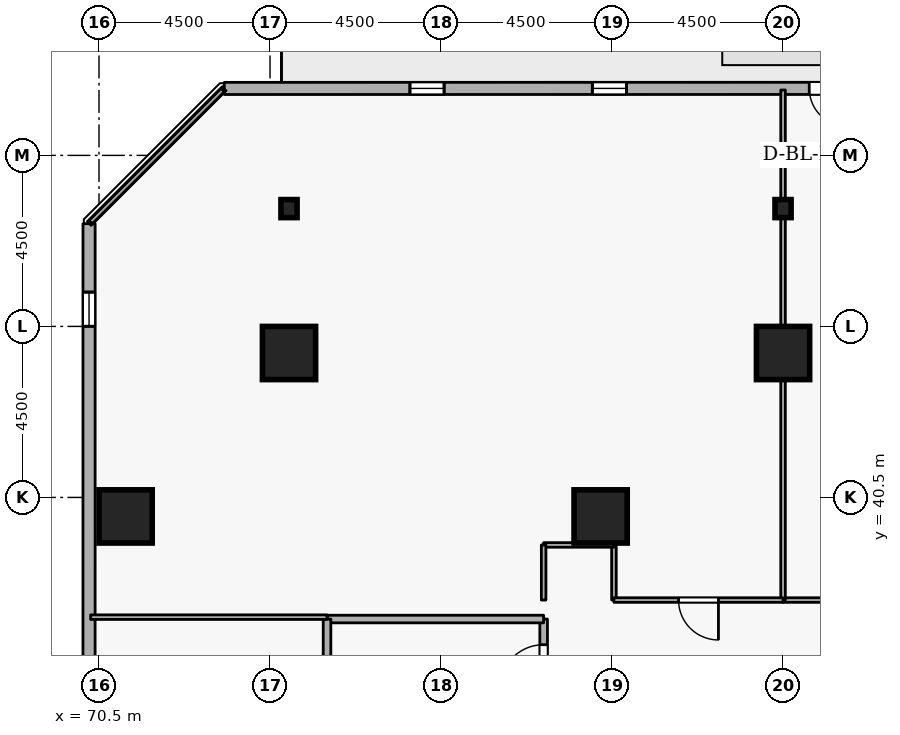
"""IFC4 building model, lengths in metres.
Left out: names, types, materials, properties, quantities, classifications, styles, units other than length and angle.
Written with IfcOpenShell. Run it as: python <this file> out.ifc"""

import sys

from ifc_helpers import new_model, si_unit, direction, frame, frame_2d, origin, origin_2d, place, context, subcontext, project, spatial, rectangle, i_section, extrude, element, fill, save


model = new_model("IFC4")
c1 = context("Model", 3, precision=1e-05, world=origin(), true_north=direction((0.0, 1.0)))
c2 = subcontext(c1, "Body", "Model", "MODEL_VIEW")
j1 = project(units=[si_unit("LENGTHUNIT", "METRE"), si_unit("PLANEANGLEUNIT", "RADIAN")], contexts=[c1])
p1 = place(None, origin())
s1 = spatial("IfcSite", under=j1, at=p1, CompositionType="ELEMENT")
p2 = place(p1, origin())
s2 = spatial("IfcBuilding", under=s1, at=p2, CompositionType="ELEMENT")
p3 = place(p2, frame((0.0, 0.0, 57.3)))
s3 = spatial("IfcBuildingStorey", under=s2, at=p3, CompositionType="ELEMENT", Elevation=57.3)
for number, where, z_axis, x_axis in (
    (1, (88.5, 44.3, 0.0), (0.0, 0.0, 1.0), (1.0, 0.0, 0.0)),
    (2, (75.5, 44.3, 0.0), (0.0, 0.0, 1.0), (1.0, 0.0, 0.0)),
    (3, (71.2, 40.0, 0.0), (0.0, 0.0, 1.0), (1.0, 0.0, 0.0)),
    (4, (83.7, 40.0, 0.0), (0.0, 0.0, 1.0), (1.0, 0.0, 0.0)),
):
    element("IfcColumn", number, at=place(p3, frame(where, z_axis=z_axis, x_axis=x_axis)), inside=s3, PredefinedType="COLUMN", context=c2, shape_type="SweptSolid", body=[
        extrude(rectangle(XDim=1.4, YDim=1.4, at=origin_2d()), origin(), (0.0, 0.0, 1.0), 3.6),
    ])
for number, where, z_axis, x_axis in (
    (5, (88.5, 48.1, 0.0), (0.0, 0.0, 1.0), (1.0, 0.0, 0.0)),
    (6, (75.5, 48.1, 0.0), (0.0, 0.0, 1.0), (1.0, 0.0, 0.0)),
):
    element("IfcColumn", number, at=place(p3, frame(where, z_axis=z_axis, x_axis=x_axis)), inside=s3, PredefinedType="COLUMN", context=c2, shape_type="SweptSolid", body=[
        extrude(i_section(OverallWidth=0.424, OverallDepth=0.475, WebThickness=0.048, FlangeThickness=0.077, FilletRadius=0.015, at=origin_2d()), origin(), (0.0, 0.0, 1.0), 3.6),
    ])
p4 = place(p3, frame((110.181, 51.265, 0.0), z_axis=(0.0, 0.0, 1.0), x_axis=(-0.999999996195, -8.7231344e-05, 0.0)))
e7 = element("IfcWall", 7, at=p4, inside=s3, PredefinedType="STANDARD", context=c2, shape_type="SweptSolid", body=[
    extrude(rectangle(XDim=36.384, YDim=0.32, at=frame_2d((18.192, 0.0))), origin(), (0.0, 0.0, 1.0), 2.7),
])
p5 = place(p4, frame((19.992, 0.0, 0.0)))
e8 = element("IfcOpeningElement", 8, at=p5, cuts=e7, PredefinedType="OPENING", context=c2, shape_type="SweptSolid", body=[
    extrude(rectangle(XDim=1.0, YDim=2.08, at=frame_2d((0.5, 1.04))), frame((0.0, 0.17, 0.0), z_axis=(0.0, -1.0, 0.0), x_axis=(1.0, 0.0, 0.0)), (0.0, 0.0, 1.0), 0.34),
])
p6 = place(p4, frame((1.8, 0.0, 0.72)))
e9 = element("IfcOpeningElement", 9, at=p6, cuts=e7, PredefinedType="OPENING", context=c2, shape_type="SweptSolid", body=[
    extrude(rectangle(XDim=0.9, YDim=1.75, at=frame_2d((0.45, 0.875))), frame((0.0, 0.17, 0.0), z_axis=(0.0, -1.0, 0.0), x_axis=(1.0, 0.0, 0.0)), (0.0, 0.0, 1.0), 0.34),
])
p7 = place(p4, frame((6.6, 0.0, 0.72)))
e10 = element("IfcOpeningElement", 10, at=p7, cuts=e7, PredefinedType="OPENING", context=c2, shape_type="SweptSolid", body=[
    extrude(rectangle(XDim=0.9, YDim=1.75, at=frame_2d((0.45, 0.875))), frame((0.0, 0.17, 0.0), z_axis=(0.0, -1.0, 0.0), x_axis=(1.0, 0.0, 0.0)), (0.0, 0.0, 1.0), 0.34),
])
p8 = place(p4, frame((11.4, 0.0, 0.72)))
e11 = element("IfcOpeningElement", 11, at=p8, cuts=e7, PredefinedType="OPENING", context=c2, shape_type="SweptSolid", body=[
    extrude(rectangle(XDim=0.9, YDim=1.75, at=frame_2d((0.45, 0.875))), frame((0.0, 0.17, 0.0), z_axis=(0.0, -1.0, 0.0), x_axis=(1.0, 0.0, 0.0)), (0.0, 0.0, 1.0), 0.34),
])
p9 = place(p4, frame((16.2, 0.0, 0.72)))
e12 = element("IfcOpeningElement", 12, at=p9, cuts=e7, PredefinedType="OPENING", context=c2, shape_type="SweptSolid", body=[
    extrude(rectangle(XDim=0.9, YDim=1.75, at=frame_2d((0.45, 0.875))), frame((0.0, 0.17, 0.0), z_axis=(0.0, -1.0, 0.0), x_axis=(1.0, 0.0, 0.0)), (0.0, 0.0, 1.0), 0.34),
])
p10 = place(p4, frame((25.8, 0.0, 0.72)))
e13 = element("IfcOpeningElement", 13, at=p10, cuts=e7, PredefinedType="OPENING", context=c2, shape_type="SweptSolid", body=[
    extrude(rectangle(XDim=0.9, YDim=1.75, at=frame_2d((0.45, 0.875))), frame((0.0, 0.17, 0.0), z_axis=(0.0, -1.0, 0.0), x_axis=(1.0, 0.0, 0.0)), (0.0, 0.0, 1.0), 0.34),
])
p11 = place(p4, frame((30.6, 0.0, 0.72)))
e14 = element("IfcOpeningElement", 14, at=p11, cuts=e7, PredefinedType="OPENING", context=c2, shape_type="SweptSolid", body=[
    extrude(rectangle(XDim=0.9, YDim=1.75, at=frame_2d((0.45, 0.875))), frame((0.0, 0.17, 0.0), z_axis=(0.0, -1.0, 0.0), x_axis=(1.0, 0.0, 0.0)), (0.0, 0.0, 1.0), 0.34),
])
p12 = place(p3, frame((70.238, 47.703, 0.0), z_axis=(0.0, 0.0, 1.0), x_axis=(-8.7231344e-05, -0.999999996195, 0.0)))
e15 = element("IfcWall", 15, at=p12, inside=s3, PredefinedType="STANDARD", context=c2, shape_type="SweptSolid", body=[
    extrude(rectangle(XDim=36.384, YDim=0.32, at=frame_2d((18.192, 0.0))), origin(), (0.0, 0.0, 1.0), 2.7),
])
p13 = place(p12, frame((1.8, 0.0, 0.72)))
e16 = element("IfcOpeningElement", 16, at=p13, cuts=e15, PredefinedType="OPENING", context=c2, shape_type="SweptSolid", body=[
    extrude(rectangle(XDim=0.9, YDim=1.75, at=frame_2d((0.45, 0.875))), frame((0.0, 0.17, 0.0), z_axis=(0.0, -1.0, 0.0), x_axis=(1.0, 0.0, 0.0)), (0.0, 0.0, 1.0), 0.34),
])
p14 = place(p12, frame((11.4, 0.0, 0.72)))
e17 = element("IfcOpeningElement", 17, at=p14, cuts=e15, PredefinedType="OPENING", context=c2, shape_type="SweptSolid", body=[
    extrude(rectangle(XDim=0.9, YDim=1.75, at=frame_2d((0.45, 0.875))), frame((0.0, 0.17, 0.0), z_axis=(0.0, -1.0, 0.0), x_axis=(1.0, 0.0, 0.0)), (0.0, 0.0, 1.0), 0.34),
])
p15 = place(p12, frame((16.2, 0.0, 0.72)))
e18 = element("IfcOpeningElement", 18, at=p15, cuts=e15, PredefinedType="OPENING", context=c2, shape_type="SweptSolid", body=[
    extrude(rectangle(XDim=0.9, YDim=1.75, at=frame_2d((0.45, 0.875))), frame((0.0, 0.17, 0.0), z_axis=(0.0, -1.0, 0.0), x_axis=(1.0, 0.0, 0.0)), (0.0, 0.0, 1.0), 0.34),
])
p16 = place(p12, frame((25.8, 0.0, 0.72)))
e19 = element("IfcOpeningElement", 19, at=p16, cuts=e15, PredefinedType="OPENING", context=c2, shape_type="SweptSolid", body=[
    extrude(rectangle(XDim=0.9, YDim=1.75, at=frame_2d((0.45, 0.875))), frame((0.0, 0.17, 0.0), z_axis=(0.0, -1.0, 0.0), x_axis=(1.0, 0.0, 0.0)), (0.0, 0.0, 1.0), 0.34),
])
p17 = place(p12, frame((30.6, 0.0, 0.72)))
e20 = element("IfcOpeningElement", 20, at=p17, cuts=e15, PredefinedType="OPENING", context=c2, shape_type="SweptSolid", body=[
    extrude(rectangle(XDim=0.9, YDim=1.75, at=frame_2d((0.45, 0.875))), frame((0.0, 0.17, 0.0), z_axis=(0.0, -1.0, 0.0), x_axis=(1.0, 0.0, 0.0)), (0.0, 0.0, 1.0), 0.34),
])
p18 = place(p3, frame((82.2, 34.8, 0.0), z_axis=(0.0, 0.0, 1.0), x_axis=(0.0, 1.0, 0.0)))
e21 = element("IfcWall", 21, at=p18, inside=s3, PredefinedType="STANDARD", context=c2, shape_type="SweptSolid", body=[
    extrude(rectangle(XDim=2.5, YDim=0.2, at=frame_2d((1.25, 0.0))), origin(), (0.0, 0.0, 1.0), 3.34),
])
p19 = place(p18, frame((0.675, 0.0, 0.0)))
e22 = element("IfcOpeningElement", 22, at=p19, cuts=e21, PredefinedType="OPENING", context=c2, shape_type="SweptSolid", body=[
    extrude(rectangle(XDim=1.15, YDim=2.1, at=frame_2d((0.575, 1.05))), frame((0.0, 0.11, 0.0), z_axis=(0.0, -1.0, 0.0), x_axis=(1.0, 0.0, 0.0)), (0.0, 0.0, 1.0), 0.22),
])
p20 = place(p3, frame((82.2, 37.3, 0.0), z_axis=(0.0, 0.0, 1.0), x_axis=(-1.0, 0.0, 0.0)))
e23 = element("IfcWall", 23, at=p20, inside=s3, PredefinedType="STANDARD", context=c2, shape_type="SweptSolid", body=[
    extrude(rectangle(XDim=5.7, YDim=0.2, at=frame_2d((2.85, 0.0))), origin(), (0.0, 0.0, 1.0), 3.34),
])
p21 = place(p3, frame((76.5, 37.3, 0.0), z_axis=(0.0, 0.0, 1.0), x_axis=(0.0, -1.0, 0.0)))
e24 = element("IfcWall", 24, at=p21, inside=s3, PredefinedType="STANDARD", context=c2, shape_type="SweptSolid", body=[
    extrude(rectangle(XDim=2.5, YDim=0.2, at=frame_2d((1.25, 0.0))), origin(), (0.0, 0.0, 1.0), 3.34),
])
p22 = place(p3, frame((92.95, 37.8, 0.0), z_axis=(0.0, 0.0, 1.0), x_axis=(-1.0, 0.0, 0.0)))
e25 = element("IfcWall", 25, at=p22, inside=s3, PredefinedType="PARTITIONING", context=c2, shape_type="SweptSolid", body=[
    extrude(rectangle(XDim=4.45, YDim=0.12, at=frame_2d((2.225, 0.0))), origin(), (0.0, 0.0, 1.0), 3.34),
])
p23 = place(p22, frame((1.7, 0.0, 0.0)))
e26 = element("IfcOpeningElement", 26, at=p23, cuts=e25, PredefinedType="OPENING", context=c2, shape_type="SweptSolid", body=[
    extrude(rectangle(XDim=1.05, YDim=2.1, at=frame_2d((0.525, 1.05))), frame((0.0, 0.07, 0.0), z_axis=(0.0, -1.0, 0.0), x_axis=(1.0, 0.0, 0.0)), (0.0, 0.0, 1.0), 0.14),
])
p24 = place(p3, frame((88.5, 37.8, 0.0), z_axis=(0.0, 0.0, 1.0), x_axis=(0.0, 1.0, 0.0)))
e27 = element("IfcWall", 27, at=p24, inside=s3, PredefinedType="PARTITIONING", context=c2, shape_type="SweptSolid", body=[
    extrude(rectangle(XDim=13.42, YDim=0.12, at=frame_2d((6.71, 0.0))), origin(), (0.0, 0.0, 1.0), 2.932),
])
p25 = place(p3, frame((84.05, 37.8, 0.0), z_axis=(0.0, 0.0, 1.0), x_axis=(0.0, 1.0, 0.0)))
e28 = element("IfcWall", 28, at=p25, inside=s3, PredefinedType="PARTITIONING", context=c2, shape_type="SweptSolid", body=[
    extrude(rectangle(XDim=1.45, YDim=0.12, at=frame_2d((0.725, 0.0))), origin(), (0.0, 0.0, 1.0), 3.34),
])
p26 = place(p3, frame((84.05, 39.25, 0.0), z_axis=(0.0, 0.0, 1.0), x_axis=(-1.0, 0.0, 0.0)))
e29 = element("IfcWall", 29, at=p26, inside=s3, PredefinedType="PARTITIONING", context=c2, shape_type="SweptSolid", body=[
    extrude(rectangle(XDim=1.85, YDim=0.12, at=frame_2d((0.925, 0.0))), origin(), (0.0, 0.0, 1.0), 3.34),
])
p27 = place(p3, frame((82.2, 39.25, 0.0), z_axis=(0.0, 0.0, 1.0), x_axis=(0.0, -1.0, 0.0)))
e30 = element("IfcWall", 30, at=p27, inside=s3, PredefinedType="PARTITIONING", context=c2, shape_type="SweptSolid", body=[
    extrude(rectangle(XDim=1.45, YDim=0.12, at=frame_2d((0.725, 0.0))), origin(), (0.0, 0.0, 1.0), 3.34),
])
p28 = place(p3, frame((76.5, 37.35, 0.0), z_axis=(0.0, 0.0, 1.0), x_axis=(-1.0, 0.0, 0.0)))
e31 = element("IfcWall", 31, at=p28, inside=s3, PredefinedType="PARTITIONING", context=c2, shape_type="SweptSolid", body=[
    extrude(rectangle(XDim=6.22, YDim=0.12, at=frame_2d((3.11, 0.0))), origin(), (0.0, 0.0, 1.0), 3.34),
])
p29 = place(p3, frame((70.28, 47.743, 0.0), z_axis=(0.0, 0.0, 1.0), x_axis=(0.707106781187, 0.707106781187, 0.0)))
e32 = element("IfcWall", 32, at=p29, inside=s3, PredefinedType="PARTITIONING", context=c2, shape_type="SweptSolid", body=[
    extrude(rectangle(XDim=4.917, YDim=0.12, at=frame_2d((2.458, 0.0))), origin(), (0.0, 0.0, 1.0), 3.34),
])
p30 = place(p3, frame((88.5, 37.8, 0.0), z_axis=(0.0, 0.0, 1.0), x_axis=(-1.0, 0.0, 0.0)))
e33 = element("IfcWall", 33, at=p30, inside=s3, PredefinedType="PARTITIONING", context=c2, shape_type="SweptSolid", body=[
    extrude(rectangle(XDim=4.45, YDim=0.12, at=frame_2d((2.225, 0.0))), origin(), (0.0, 0.0, 1.0), 3.34),
])
p31 = place(p30, frame((1.7, 0.0, 0.0)))
e34 = element("IfcOpeningElement", 34, at=p31, cuts=e33, PredefinedType="OPENING", context=c2, shape_type="SweptSolid", body=[
    extrude(rectangle(XDim=1.05, YDim=2.1, at=frame_2d((0.525, 1.05))), frame((0.0, 0.07, 0.0), z_axis=(0.0, -1.0, 0.0), x_axis=(1.0, 0.0, 0.0)), (0.0, 0.0, 1.0), 0.14),
])
p32 = place(p5, origin())
e35 = element("IfcDoor", 35, at=p32, inside=s3, OperationType="SINGLE_SWING_LEFT", PredefinedType="DOOR", context=c2, shape_type="SweptSolid", body=[
    extrude(rectangle(XDim=1.0, YDim=2.08, at=frame_2d((0.5, 1.04))), frame((0.0, 0.025, 0.0), z_axis=(0.0, -1.0, 0.0), x_axis=(1.0, 0.0, 0.0)), (0.0, 0.0, 1.0), 0.05),
])
fill(e8, e35)
p33 = place(p10, origin())
e36 = element("IfcWindow", 36, at=p33, inside=s3, PartitioningType="SINGLE_PANEL", PredefinedType="WINDOW", context=c2, shape_type="SweptSolid", body=[
    extrude(rectangle(XDim=0.9, YDim=1.75, at=frame_2d((0.45, 0.875))), frame((0.0, 0.03, 0.0), z_axis=(0.0, -1.0, 0.0), x_axis=(1.0, 0.0, 0.0)), (0.0, 0.0, 1.0), 0.06),
])
fill(e13, e36)
p34 = place(p11, origin())
e37 = element("IfcWindow", 37, at=p34, inside=s3, PartitioningType="SINGLE_PANEL", PredefinedType="WINDOW", context=c2, shape_type="SweptSolid", body=[
    extrude(rectangle(XDim=0.9, YDim=1.75, at=frame_2d((0.45, 0.875))), frame((0.0, 0.03, 0.0), z_axis=(0.0, -1.0, 0.0), x_axis=(1.0, 0.0, 0.0)), (0.0, 0.0, 1.0), 0.06),
])
fill(e14, e37)
p35 = place(p13, origin())
e38 = element("IfcWindow", 38, at=p35, inside=s3, PartitioningType="SINGLE_PANEL", PredefinedType="WINDOW", context=c2, shape_type="SweptSolid", body=[
    extrude(rectangle(XDim=0.9, YDim=1.75, at=frame_2d((0.45, 0.875))), frame((0.0, 0.03, 0.0), z_axis=(0.0, -1.0, 0.0), x_axis=(1.0, 0.0, 0.0)), (0.0, 0.0, 1.0), 0.06),
])
fill(e16, e38)
p36 = place(p19, origin())
e39 = element("IfcDoor", 39, at=p36, inside=s3, OperationType="SINGLE_SWING_LEFT", PredefinedType="DOOR", context=c2, shape_type="SweptSolid", body=[
    extrude(rectangle(XDim=1.15, YDim=2.1, at=frame_2d((0.575, 1.05))), frame((0.0, 0.025, 0.0), z_axis=(0.0, -1.0, 0.0), x_axis=(1.0, 0.0, 0.0)), (0.0, 0.0, 1.0), 0.05),
])
fill(e22, e39)
p37 = place(p31, origin())
e40 = element("IfcDoor", 40, at=p37, inside=s3, OperationType="SINGLE_SWING_LEFT", PredefinedType="DOOR", context=c2, shape_type="SweptSolid", body=[
    extrude(rectangle(XDim=1.05, YDim=2.1, at=frame_2d((0.525, 1.05))), frame((0.0, 0.025, 0.0), z_axis=(0.0, -1.0, 0.0), x_axis=(1.0, 0.0, 0.0)), (0.0, 0.0, 1.0), 0.05),
])
fill(e34, e40)
save(model, sys.argv[1])
